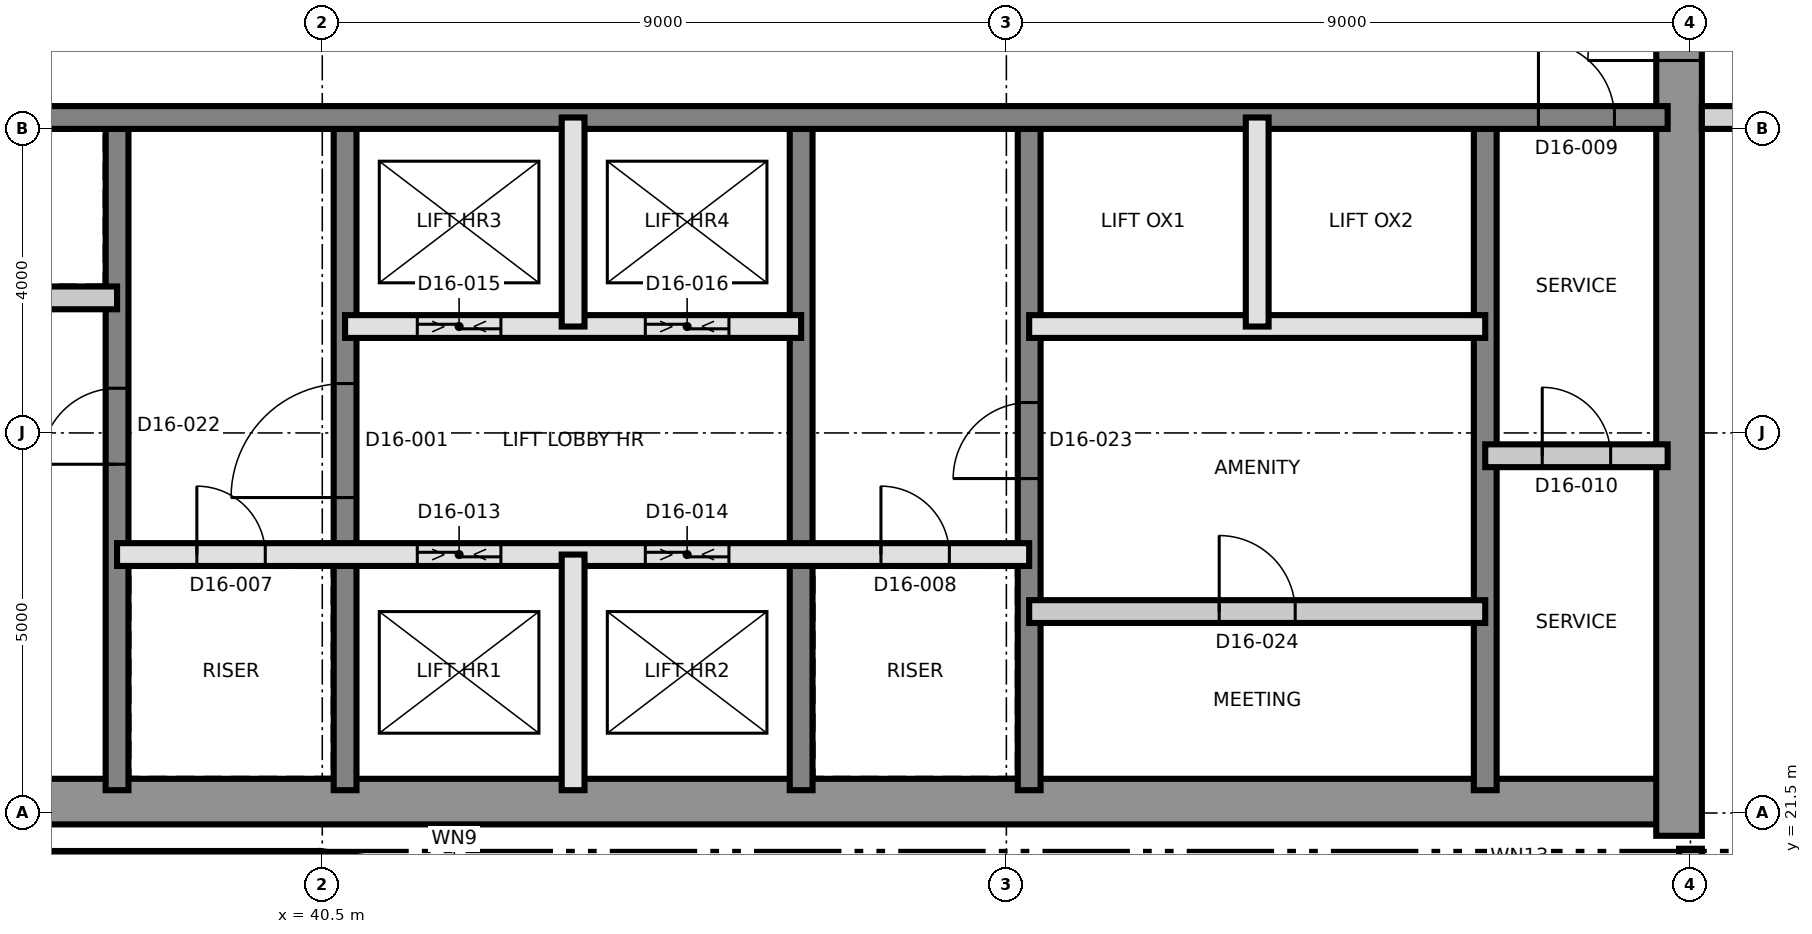
"""IFC4 building model, lengths in metres.
Left out: names, types, materials, properties, quantities, classifications, styles, units other than length and angle.
Written with IfcOpenShell. Run it as: python <this file> out.ifc"""

import sys

from ifc_helpers import new_model, si_unit, direction, frame, frame_2d, origin, place, context, subcontext, project, spatial, rectangle, extrude, element, fill, save


model = new_model("IFC4")
c1 = context("Model", 3, precision=1e-05, world=origin(), true_north=direction((0.0, 1.0)))
c2 = subcontext(c1, "Body", "Model", "MODEL_VIEW")
j1 = project(units=[si_unit("LENGTHUNIT", "METRE"), si_unit("PLANEANGLEUNIT", "RADIAN")], contexts=[c1])
p1 = place(None, origin())
s1 = spatial("IfcSite", under=j1, at=p1, CompositionType="ELEMENT")
p2 = place(p1, origin())
s2 = spatial("IfcBuilding", under=s1, at=p2, CompositionType="ELEMENT")
p3 = place(p2, frame((0.0, 0.0, 164.4)))
s3 = spatial("IfcBuildingStorey", under=s2, at=p3, CompositionType="ELEMENT", Elevation=164.4)
p4 = place(p3, frame((31.2, 21.65, 0.0), z_axis=(0.0, 0.0, 1.0), x_axis=(1.0, 0.0, 0.0)))
e1 = element("IfcWall", 1, at=p4, inside=s3, PredefinedType="SHEAR", context=c2, shape_type="SweptSolid", body=[
    extrude(rectangle(XDim=27.0, YDim=0.6, at=frame_2d((13.5, 0.0))), origin(), (0.0, 0.0, 1.0), 3.7),
])
p5 = place(p3, frame((58.35, 21.2, 0.0), z_axis=(0.0, 0.0, 1.0), x_axis=(0.0, 1.0, 0.0)))
e2 = element("IfcWall", 2, at=p5, inside=s3, PredefinedType="SHEAR", context=c2, shape_type="SweptSolid", body=[
    extrude(rectangle(XDim=18.6, YDim=0.6, at=frame_2d((9.3, 0.0))), origin(), (0.0, 0.0, 1.0), 3.7),
])
p6 = place(p5, frame((10.2, 0.0, 0.0)))
e3 = element("IfcOpeningElement", 3, at=p6, cuts=e2, PredefinedType="OPENING", context=c2, shape_type="SweptSolid", body=[
    extrude(rectangle(XDim=1.2, YDim=2.1, at=frame_2d((0.6, 1.05))), frame((0.0, 0.31, 0.0), z_axis=(0.0, -1.0, 0.0), x_axis=(1.0, 0.0, 0.0)), (0.0, 0.0, 1.0), 0.62),
])
p7 = place(p3, frame((37.8, 21.8, 0.0), z_axis=(0.0, 0.0, 1.0), x_axis=(0.0, 1.0, 0.0)))
e4 = element("IfcWall", 4, at=p7, inside=s3, PredefinedType="SHEAR", context=c2, shape_type="SweptSolid", body=[
    extrude(rectangle(XDim=8.7, YDim=0.3, at=frame_2d((4.35, 0.0))), origin(), (0.0, 0.0, 1.0), 3.7),
])
p8 = place(p7, frame((4.288, 0.0, 0.0)))
e5 = element("IfcOpeningElement", 5, at=p8, cuts=e4, PredefinedType="OPENING", context=c2, shape_type="SweptSolid", body=[
    extrude(rectangle(XDim=1.0, YDim=2.1, at=frame_2d((0.5, 1.05))), frame((0.0, 0.16, 0.0), z_axis=(0.0, -1.0, 0.0), x_axis=(1.0, 0.0, 0.0)), (0.0, 0.0, 1.0), 0.32),
])
p9 = place(p3, frame((40.8, 21.8, 0.0), z_axis=(0.0, 0.0, 1.0), x_axis=(0.0, 1.0, 0.0)))
e6 = element("IfcWall", 6, at=p9, inside=s3, PredefinedType="SHEAR", context=c2, shape_type="SweptSolid", body=[
    extrude(rectangle(XDim=8.7, YDim=0.3, at=frame_2d((4.35, 0.0))), origin(), (0.0, 0.0, 1.0), 3.7),
])
p10 = place(p9, frame((3.85, 0.0, 0.0)))
e7 = element("IfcOpeningElement", 7, at=p10, cuts=e6, PredefinedType="OPENING", context=c2, shape_type="SweptSolid", body=[
    extrude(rectangle(XDim=1.5, YDim=2.1, at=frame_2d((0.75, 1.05))), frame((0.0, 0.16, 0.0), z_axis=(0.0, -1.0, 0.0), x_axis=(1.0, 0.0, 0.0)), (0.0, 0.0, 1.0), 0.32),
])
p11 = place(p3, frame((46.8, 21.8, 0.0), z_axis=(0.0, 0.0, 1.0), x_axis=(0.0, 1.0, 0.0)))
e8 = element("IfcWall", 8, at=p11, inside=s3, PredefinedType="SHEAR", context=c2, shape_type="SweptSolid", body=[
    extrude(rectangle(XDim=8.7, YDim=0.3, at=frame_2d((4.35, 0.0))), origin(), (0.0, 0.0, 1.0), 3.7),
])
p12 = place(p3, frame((49.8, 21.8, 0.0), z_axis=(0.0, 0.0, 1.0), x_axis=(0.0, 1.0, 0.0)))
e9 = element("IfcWall", 9, at=p12, inside=s3, PredefinedType="SHEAR", context=c2, shape_type="SweptSolid", body=[
    extrude(rectangle(XDim=8.7, YDim=0.3, at=frame_2d((4.35, 0.0))), origin(), (0.0, 0.0, 1.0), 3.7),
])
p13 = place(p12, frame((4.1, 0.0, 0.0)))
e10 = element("IfcOpeningElement", 10, at=p13, cuts=e9, PredefinedType="OPENING", context=c2, shape_type="SweptSolid", body=[
    extrude(rectangle(XDim=1.0, YDim=2.1, at=frame_2d((0.5, 1.05))), frame((0.0, 0.16, 0.0), z_axis=(0.0, -1.0, 0.0), x_axis=(1.0, 0.0, 0.0)), (0.0, 0.0, 1.0), 0.32),
])
p14 = place(p3, frame((55.8, 21.8, 0.0), z_axis=(0.0, 0.0, 1.0), x_axis=(0.0, 1.0, 0.0)))
e11 = element("IfcWall", 11, at=p14, inside=s3, PredefinedType="SHEAR", context=c2, shape_type="SweptSolid", body=[
    extrude(rectangle(XDim=8.7, YDim=0.3, at=frame_2d((4.35, 0.0))), origin(), (0.0, 0.0, 1.0), 3.7),
])
p15 = place(p3, frame((31.8, 30.65, 0.0), z_axis=(0.0, 0.0, 1.0), x_axis=(1.0, 0.0, 0.0)))
e12 = element("IfcWall", 12, at=p15, inside=s3, PredefinedType="SHEAR", context=c2, shape_type="SweptSolid", body=[
    extrude(rectangle(XDim=26.4, YDim=0.3, at=frame_2d((13.2, 0.0))), origin(), (0.0, 0.0, 1.0), 3.7),
])
p16 = place(p15, frame((24.7, 0.0, 0.0)))
e13 = element("IfcOpeningElement", 13, at=p16, cuts=e12, PredefinedType="OPENING", context=c2, shape_type="SweptSolid", body=[
    extrude(rectangle(XDim=1.0, YDim=2.1, at=frame_2d((0.5, 1.05))), frame((0.0, 0.16, 0.0), z_axis=(0.0, -1.0, 0.0), x_axis=(1.0, 0.0, 0.0)), (0.0, 0.0, 1.0), 0.32),
])
p17 = place(p15, frame((4.0, 0.0, 0.0)))
e14 = element("IfcOpeningElement", 14, at=p17, cuts=e12, PredefinedType="OPENING", context=c2, shape_type="SweptSolid", body=[
    extrude(rectangle(XDim=1.0, YDim=2.1, at=frame_2d((0.5, 1.05))), frame((0.0, 0.16, 0.0), z_axis=(0.0, -1.0, 0.0), x_axis=(1.0, 0.0, 0.0)), (0.0, 0.0, 1.0), 0.32),
])
p18 = place(p3, frame((31.36, 20.85, 0.0), z_axis=(0.0, 0.0, 1.0), x_axis=(1.0, 0.0, 0.0)))
e15 = element("IfcWall", 15, at=p18, inside=s3, PredefinedType="SOLIDWALL", context=c2, shape_type="SweptSolid", body=[
    extrude(rectangle(XDim=9.094, YDim=0.3, at=frame_2d((4.547, 0.0))), origin(), (0.0, 0.0, 1.0), 3.4),
])
p19 = place(p3, frame((40.474, 20.849, 0.0), z_axis=(0.0, 0.0, 1.0), x_axis=(0.990778329255, -0.135492812649, 0.0)))
e16 = element("IfcWall", 16, at=p19, inside=s3, PredefinedType="SOLIDWALL", context=c2, shape_type="SweptSolid", body=[
    extrude(rectangle(XDim=3.559, YDim=0.3, at=frame_2d((1.779, 0.0))), origin(), (0.0, 0.0, 1.0), 3.4),
])
p20 = place(p19, frame((1.179, 0.0, 0.9)))
e17 = element("IfcOpeningElement", 17, at=p20, cuts=e16, PredefinedType="OPENING", context=c2, shape_type="SweptSolid", body=[
    extrude(rectangle(XDim=1.2, YDim=1.5, at=frame_2d((0.6, 0.75))), frame((0.0, 0.16, 0.0), z_axis=(0.0, -1.0, 0.0), x_axis=(1.0, 0.0, 0.0)), (0.0, 0.0, 1.0), 0.32),
])
p21 = place(p3, frame((49.8, 24.15, 0.0), z_axis=(0.0, 0.0, 1.0), x_axis=(1.0, 0.0, 0.0)))
e18 = element("IfcWall", 18, at=p21, inside=s3, PredefinedType="PARTITIONING", context=c2, shape_type="SweptSolid", body=[
    extrude(rectangle(XDim=6.0, YDim=0.3, at=frame_2d((3.0, 0.0))), origin(), (0.0, 0.0, 1.0), 3.4),
])
p22 = place(p21, frame((2.5, 0.0, 0.0)))
e19 = element("IfcOpeningElement", 19, at=p22, cuts=e18, PredefinedType="OPENING", context=c2, shape_type="SweptSolid", body=[
    extrude(rectangle(XDim=1.0, YDim=2.1, at=frame_2d((0.5, 1.05))), frame((0.0, 0.16, 0.0), z_axis=(0.0, -1.0, 0.0), x_axis=(1.0, 0.0, 0.0)), (0.0, 0.0, 1.0), 0.32),
])
p23 = place(p3, frame((37.8, 24.9, 0.0), z_axis=(0.0, 0.0, 1.0), x_axis=(1.0, 0.0, 0.0)))
e20 = element("IfcWall", 20, at=p23, inside=s3, PredefinedType="SOLIDWALL", context=c2, shape_type="SweptSolid", body=[
    extrude(rectangle(XDim=12.0, YDim=0.3, at=frame_2d((6.0, 0.0))), origin(), (0.0, 0.0, 1.0), 3.4),
])
p24 = place(p23, frame((1.05, 0.0, 0.0)))
e21 = element("IfcOpeningElement", 21, at=p24, cuts=e20, PredefinedType="OPENING", context=c2, shape_type="SweptSolid", body=[
    extrude(rectangle(XDim=0.9, YDim=2.1, at=frame_2d((0.45, 1.05))), frame((0.0, 0.16, 0.0), z_axis=(0.0, -1.0, 0.0), x_axis=(1.0, 0.0, 0.0)), (0.0, 0.0, 1.0), 0.32),
])
p25 = place(p23, frame((10.05, 0.0, 0.0)))
e22 = element("IfcOpeningElement", 22, at=p25, cuts=e20, PredefinedType="OPENING", context=c2, shape_type="SweptSolid", body=[
    extrude(rectangle(XDim=0.9, YDim=2.1, at=frame_2d((0.45, 1.05))), frame((0.0, 0.16, 0.0), z_axis=(0.0, -1.0, 0.0), x_axis=(1.0, 0.0, 0.0)), (0.0, 0.0, 1.0), 0.32),
])
p26 = place(p23, frame((3.95, 0.0, 0.0)))
e23 = element("IfcOpeningElement", 23, at=p26, cuts=e20, PredefinedType="OPENING", context=c2, shape_type="SweptSolid", body=[
    extrude(rectangle(XDim=1.1, YDim=2.4, at=frame_2d((0.55, 1.2))), frame((0.0, 0.16, 0.0), z_axis=(0.0, -1.0, 0.0), x_axis=(1.0, 0.0, 0.0)), (0.0, 0.0, 1.0), 0.32),
])
p27 = place(p23, frame((6.95, 0.0, 0.0)))
e24 = element("IfcOpeningElement", 24, at=p27, cuts=e20, PredefinedType="OPENING", context=c2, shape_type="SweptSolid", body=[
    extrude(rectangle(XDim=1.1, YDim=2.4, at=frame_2d((0.55, 1.2))), frame((0.0, 0.16, 0.0), z_axis=(0.0, -1.0, 0.0), x_axis=(1.0, 0.0, 0.0)), (0.0, 0.0, 1.0), 0.32),
])
p28 = place(p3, frame((55.8, 26.2, 0.0), z_axis=(0.0, 0.0, 1.0), x_axis=(1.0, 0.0, 0.0)))
e25 = element("IfcWall", 25, at=p28, inside=s3, PredefinedType="PARTITIONING", context=c2, shape_type="SweptSolid", body=[
    extrude(rectangle(XDim=2.4, YDim=0.3, at=frame_2d((1.2, 0.0))), origin(), (0.0, 0.0, 1.0), 3.4),
])
p29 = place(p28, frame((0.75, 0.0, 0.0)))
e26 = element("IfcOpeningElement", 26, at=p29, cuts=e25, PredefinedType="OPENING", context=c2, shape_type="SweptSolid", body=[
    extrude(rectangle(XDim=0.9, YDim=2.1, at=frame_2d((0.45, 1.05))), frame((0.0, 0.16, 0.0), z_axis=(0.0, -1.0, 0.0), x_axis=(1.0, 0.0, 0.0)), (0.0, 0.0, 1.0), 0.32),
])
p30 = place(p3, frame((40.8, 27.9, 0.0), z_axis=(0.0, 0.0, 1.0), x_axis=(1.0, 0.0, 0.0)))
e27 = element("IfcWall", 27, at=p30, inside=s3, PredefinedType="SOLIDWALL", context=c2, shape_type="SweptSolid", body=[
    extrude(rectangle(XDim=6.0, YDim=0.3, at=frame_2d((3.0, 0.0))), origin(), (0.0, 0.0, 1.0), 3.4),
])
p31 = place(p30, frame((0.95, 0.0, 0.0)))
e28 = element("IfcOpeningElement", 28, at=p31, cuts=e27, PredefinedType="OPENING", context=c2, shape_type="SweptSolid", body=[
    extrude(rectangle(XDim=1.1, YDim=2.4, at=frame_2d((0.55, 1.2))), frame((0.0, 0.16, 0.0), z_axis=(0.0, -1.0, 0.0), x_axis=(1.0, 0.0, 0.0)), (0.0, 0.0, 1.0), 0.32),
])
p32 = place(p30, frame((3.95, 0.0, 0.0)))
e29 = element("IfcOpeningElement", 29, at=p32, cuts=e27, PredefinedType="OPENING", context=c2, shape_type="SweptSolid", body=[
    extrude(rectangle(XDim=1.1, YDim=2.4, at=frame_2d((0.55, 1.2))), frame((0.0, 0.16, 0.0), z_axis=(0.0, -1.0, 0.0), x_axis=(1.0, 0.0, 0.0)), (0.0, 0.0, 1.0), 0.32),
])
p33 = place(p3, frame((49.8, 27.9, 0.0), z_axis=(0.0, 0.0, 1.0), x_axis=(1.0, 0.0, 0.0)))
e30 = element("IfcWall", 30, at=p33, inside=s3, PredefinedType="SOLIDWALL", context=c2, shape_type="SweptSolid", body=[
    extrude(rectangle(XDim=6.0, YDim=0.3, at=frame_2d((3.0, 0.0))), origin(), (0.0, 0.0, 1.0), 3.4),
])
p34 = place(p3, frame((31.8, 28.277, 0.0), z_axis=(0.0, 0.0, 1.0), x_axis=(1.0, 0.0, 0.0)))
e31 = element("IfcWall", 31, at=p34, inside=s3, PredefinedType="PARTITIONING", context=c2, shape_type="SweptSolid", body=[
    extrude(rectangle(XDim=6.0, YDim=0.3, at=frame_2d((3.0, 0.0))), origin(), (0.0, 0.0, 1.0), 3.4),
])
p35 = place(p3, frame((43.8, 21.8, 0.0), z_axis=(0.0, 0.0, 1.0), x_axis=(0.0, 1.0, 0.0)))
e32 = element("IfcWall", 32, at=p35, inside=s3, PredefinedType="SOLIDWALL", context=c2, shape_type="SweptSolid", body=[
    extrude(rectangle(XDim=3.1, YDim=0.3, at=frame_2d((1.55, 0.0))), origin(), (0.0, 0.0, 1.0), 3.4),
])
for number, where, z_axis, x_axis in (
    (33, (43.8, 27.9, 0.0), (0.0, 0.0, 1.0), (0.0, 1.0, 0.0)),
    (34, (52.8, 27.9, 0.0), (0.0, 0.0, 1.0), (0.0, 1.0, 0.0)),
):
    element("IfcWall", number, at=place(p3, frame(where, z_axis=z_axis, x_axis=x_axis)), inside=s3, PredefinedType="SOLIDWALL", context=c2, shape_type="SweptSolid", body=[
        extrude(rectangle(XDim=2.75, YDim=0.3, at=frame_2d((1.375, 0.0))), origin(), (0.0, 0.0, 1.0), 3.4),
    ])
p36 = place(p3, frame((58.65, 30.65, 0.0), z_axis=(0.0, 0.0, 1.0), x_axis=(1.0, 0.0, 0.0)))
e35 = element("IfcWall", 35, at=p36, inside=s3, PredefinedType="PARTITIONING", context=c2, shape_type="SweptSolid", body=[
    extrude(rectangle(XDim=8.5, YDim=0.3, at=frame_2d((4.25, 0.0))), origin(), (0.0, 0.0, 1.0), 3.4),
])
p37 = place(p36, frame((0.919, 0.0, 0.0)))
e36 = element("IfcOpeningElement", 36, at=p37, cuts=e35, PredefinedType="OPENING", context=c2, shape_type="SweptSolid", body=[
    extrude(rectangle(XDim=1.2, YDim=2.1, at=frame_2d((0.6, 1.05))), frame((0.0, 0.16, 0.0), z_axis=(0.0, -1.0, 0.0), x_axis=(1.0, 0.0, 0.0)), (0.0, 0.0, 1.0), 0.32),
])
p38 = place(p36, frame((3.969, 0.0, 0.0)))
e37 = element("IfcOpeningElement", 37, at=p38, cuts=e35, PredefinedType="OPENING", context=c2, shape_type="SweptSolid", body=[
    extrude(rectangle(XDim=1.0, YDim=2.1, at=frame_2d((0.5, 1.05))), frame((0.0, 0.16, 0.0), z_axis=(0.0, -1.0, 0.0), x_axis=(1.0, 0.0, 0.0)), (0.0, 0.0, 1.0), 0.32),
])
p39 = place(p3, frame((58.5, 20.565, 0.0), z_axis=(0.0, 0.0, 1.0), x_axis=(0.0, 1.0, 0.0)))
e38 = element("IfcWall", 38, at=p39, inside=s3, PredefinedType="PARTITIONING", context=c2, shape_type="SweptSolid", body=[
    extrude(rectangle(XDim=0.465, YDim=0.3, at=frame_2d((0.232, 0.0))), origin(), (0.0, 0.0, 1.0), 3.4),
])
p40 = place(p10, origin())
e39 = element("IfcDoor", 39, at=p40, inside=s3, OperationType="SINGLE_SWING_RIGHT", PredefinedType="DOOR", context=c2, shape_type="SweptSolid", body=[
    extrude(rectangle(XDim=1.5, YDim=2.1, at=frame_2d((0.75, 1.05))), frame((0.0, 0.025, 0.0), z_axis=(0.0, -1.0, 0.0), x_axis=(1.0, 0.0, 0.0)), (0.0, 0.0, 1.0), 0.05),
])
fill(e7, e39)
p41 = place(p24, origin())
e40 = element("IfcDoor", 40, at=p41, inside=s3, OperationType="SINGLE_SWING_LEFT", PredefinedType="DOOR", context=c2, shape_type="SweptSolid", body=[
    extrude(rectangle(XDim=0.9, YDim=2.1, at=frame_2d((0.45, 1.05))), frame((0.0, 0.025, 0.0), z_axis=(0.0, -1.0, 0.0), x_axis=(1.0, 0.0, 0.0)), (0.0, 0.0, 1.0), 0.05),
])
fill(e21, e40)
p42 = place(p25, origin())
e41 = element("IfcDoor", 41, at=p42, inside=s3, OperationType="SINGLE_SWING_RIGHT", PredefinedType="DOOR", context=c2, shape_type="SweptSolid", body=[
    extrude(rectangle(XDim=0.9, YDim=2.1, at=frame_2d((0.45, 1.05))), frame((0.0, 0.025, 0.0), z_axis=(0.0, -1.0, 0.0), x_axis=(1.0, 0.0, 0.0)), (0.0, 0.0, 1.0), 0.05),
])
fill(e22, e41)
p43 = place(p16, origin())
e42 = element("IfcDoor", 42, at=p43, inside=s3, OperationType="SINGLE_SWING_LEFT", PredefinedType="DOOR", context=c2, shape_type="SweptSolid", body=[
    extrude(rectangle(XDim=1.0, YDim=2.1, at=frame_2d((0.5, 1.05))), frame((0.0, 0.025, 0.0), z_axis=(0.0, -1.0, 0.0), x_axis=(1.0, 0.0, 0.0)), (0.0, 0.0, 1.0), 0.05),
])
fill(e13, e42)
p44 = place(p29, origin())
e43 = element("IfcDoor", 43, at=p44, inside=s3, OperationType="SINGLE_SWING_RIGHT", PredefinedType="DOOR", context=c2, shape_type="SweptSolid", body=[
    extrude(rectangle(XDim=0.9, YDim=2.1, at=frame_2d((0.45, 1.05))), frame((0.0, 0.025, 0.0), z_axis=(0.0, -1.0, 0.0), x_axis=(1.0, 0.0, 0.0)), (0.0, 0.0, 1.0), 0.05),
])
fill(e26, e43)
p45 = place(p6, origin())
e44 = element("IfcDoor", 44, at=p45, inside=s3, OperationType="SINGLE_SWING_LEFT", PredefinedType="DOOR", context=c2, shape_type="SweptSolid", body=[
    extrude(rectangle(XDim=1.2, YDim=2.1, at=frame_2d((0.6, 1.05))), frame((0.0, 0.025, 0.0), z_axis=(0.0, -1.0, 0.0), x_axis=(1.0, 0.0, 0.0)), (0.0, 0.0, 1.0), 0.05),
])
fill(e3, e44)
p46 = place(p26, origin())
e45 = element("IfcDoor", 45, at=p46, inside=s3, OperationType="SLIDING_TO_LEFT", PredefinedType="DOOR", context=c2, shape_type="SweptSolid", body=[
    extrude(rectangle(XDim=1.1, YDim=2.4, at=frame_2d((0.55, 1.2))), frame((0.0, 0.025, 0.0), z_axis=(0.0, -1.0, 0.0), x_axis=(1.0, 0.0, 0.0)), (0.0, 0.0, 1.0), 0.05),
])
fill(e23, e45)
p47 = place(p27, origin())
e46 = element("IfcDoor", 46, at=p47, inside=s3, OperationType="SLIDING_TO_LEFT", PredefinedType="DOOR", context=c2, shape_type="SweptSolid", body=[
    extrude(rectangle(XDim=1.1, YDim=2.4, at=frame_2d((0.55, 1.2))), frame((0.0, 0.025, 0.0), z_axis=(0.0, -1.0, 0.0), x_axis=(1.0, 0.0, 0.0)), (0.0, 0.0, 1.0), 0.05),
])
fill(e24, e46)
p48 = place(p31, origin())
e47 = element("IfcDoor", 47, at=p48, inside=s3, OperationType="SLIDING_TO_LEFT", PredefinedType="DOOR", context=c2, shape_type="SweptSolid", body=[
    extrude(rectangle(XDim=1.1, YDim=2.4, at=frame_2d((0.55, 1.2))), frame((0.0, 0.025, 0.0), z_axis=(0.0, -1.0, 0.0), x_axis=(1.0, 0.0, 0.0)), (0.0, 0.0, 1.0), 0.05),
])
fill(e28, e47)
p49 = place(p32, origin())
e48 = element("IfcDoor", 48, at=p49, inside=s3, OperationType="SLIDING_TO_LEFT", PredefinedType="DOOR", context=c2, shape_type="SweptSolid", body=[
    extrude(rectangle(XDim=1.1, YDim=2.4, at=frame_2d((0.55, 1.2))), frame((0.0, 0.025, 0.0), z_axis=(0.0, -1.0, 0.0), x_axis=(1.0, 0.0, 0.0)), (0.0, 0.0, 1.0), 0.05),
])
fill(e29, e48)
p50 = place(p8, origin())
e49 = element("IfcDoor", 49, at=p50, inside=s3, OperationType="SINGLE_SWING_RIGHT", PredefinedType="DOOR", context=c2, shape_type="SweptSolid", body=[
    extrude(rectangle(XDim=1.0, YDim=2.1, at=frame_2d((0.5, 1.05))), frame((0.0, 0.025, 0.0), z_axis=(0.0, -1.0, 0.0), x_axis=(1.0, 0.0, 0.0)), (0.0, 0.0, 1.0), 0.05),
])
fill(e5, e49)
p51 = place(p13, origin())
e50 = element("IfcDoor", 50, at=p51, inside=s3, OperationType="SINGLE_SWING_LEFT", PredefinedType="DOOR", context=c2, shape_type="SweptSolid", body=[
    extrude(rectangle(XDim=1.0, YDim=2.1, at=frame_2d((0.5, 1.05))), frame((0.0, 0.025, 0.0), z_axis=(0.0, -1.0, 0.0), x_axis=(1.0, 0.0, 0.0)), (0.0, 0.0, 1.0), 0.05),
])
fill(e10, e50)
p52 = place(p22, origin())
e51 = element("IfcDoor", 51, at=p52, inside=s3, OperationType="SINGLE_SWING_RIGHT", PredefinedType="DOOR", context=c2, shape_type="SweptSolid", body=[
    extrude(rectangle(XDim=1.0, YDim=2.1, at=frame_2d((0.5, 1.05))), frame((0.0, 0.025, 0.0), z_axis=(0.0, -1.0, 0.0), x_axis=(1.0, 0.0, 0.0)), (0.0, 0.0, 1.0), 0.05),
])
fill(e19, e51)
save(model, sys.argv[1])
